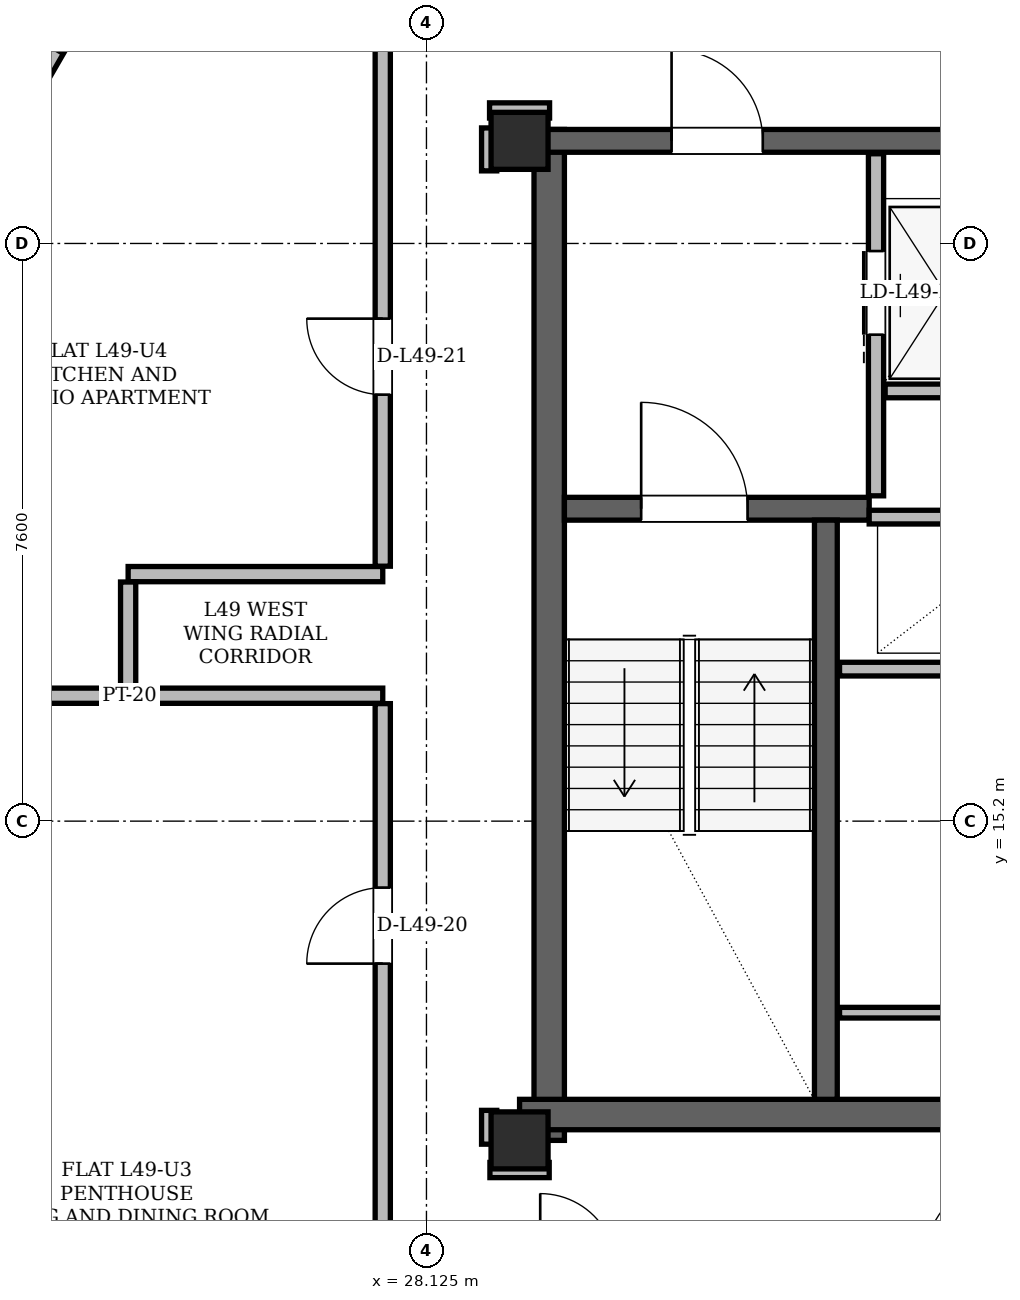
"""IFC4 building model, lengths in metres.
Left out: names, types, materials, properties, quantities, classifications, styles, units other than length and angle.
Written with IfcOpenShell. Run it as: python <this file> out.ifc"""

import sys

from ifc_helpers import new_model, si_unit, direction, frame, frame_2d, origin, origin_2d, place, context, subcontext, project, spatial, rectangle, hollow_rectangle, extrude, element, fill, save


model = new_model("IFC4")
c1 = context("Model", 3, precision=1e-05, world=origin(), true_north=direction((0.0, 1.0)))
c2 = subcontext(c1, "Body", "Model", "MODEL_VIEW")
j1 = project(units=[si_unit("LENGTHUNIT", "METRE"), si_unit("PLANEANGLEUNIT", "RADIAN")], contexts=[c1])
p1 = place(None, origin())
s1 = spatial("IfcSite", under=j1, at=p1, CompositionType="ELEMENT")
p2 = place(p1, origin())
s2 = spatial("IfcBuilding", under=s1, at=p2, CompositionType="ELEMENT")
p3 = place(p2, frame((0.0, 0.0, 185.4)))
s3 = spatial("IfcBuildingStorey", under=s2, at=p3, CompositionType="ELEMENT", Elevation=185.4)
for number, where, z_axis, x_axis in (
    (1, (29.35, 11.0, 0.0), (0.0, 0.0, 1.0), (1.0, 0.0, 0.0)),
    (2, (29.35, 24.15, 0.0), (0.0, 0.0, 1.0), (1.0, 0.0, 0.0)),
):
    element("IfcColumn", number, at=place(p3, frame(where, z_axis=z_axis, x_axis=x_axis)), inside=s3, PredefinedType="COLUMN", context=c2, shape_type="SweptSolid", body=[
        extrude(hollow_rectangle(XDim=0.75, YDim=0.75, WallThickness=0.06, at=origin_2d()), origin(), (0.0, 0.0, 1.0), 3.6),
    ])
p4 = place(p3, frame((29.74, 11.0, 0.0), z_axis=(0.0, 0.0, 1.0), x_axis=(0.0, 1.0, 0.0)))
e3 = element("IfcWall", 3, at=p4, inside=s3, PredefinedType="SHEAR", context=c2, shape_type="SweptSolid", body=[
    extrude(rectangle(XDim=13.3, YDim=0.4, at=frame_2d((6.65, 0.0))), origin(), (0.0, 0.0, 1.0), 3.34),
])
p5 = place(p3, frame((29.35, 11.34, 0.0), z_axis=(0.0, 0.0, 1.0), x_axis=(1.0, 0.0, 0.0)))
e4 = element("IfcWall", 4, at=p5, inside=s3, PredefinedType="SHEAR", context=c2, shape_type="SweptSolid", body=[
    extrude(rectangle(XDim=7.1, YDim=0.4, at=frame_2d((3.55, 0.0))), origin(), (0.0, 0.0, 1.0), 3.34),
])
p6 = place(p3, frame((29.65, 24.15, 0.0), z_axis=(0.0, 0.0, 1.0), x_axis=(1.0, 0.0, 0.0)))
e5 = element("IfcWall", 5, at=p6, inside=s3, PredefinedType="SHEAR", context=c2, shape_type="SweptSolid", body=[
    extrude(rectangle(XDim=15.7, YDim=0.3, at=frame_2d((7.85, 0.0))), origin(), (0.0, 0.0, 1.0), 3.34),
])
p7 = place(p6, frame((1.7, 0.0, 0.0)))
e6 = element("IfcOpeningElement", 6, at=p7, cuts=e5, PredefinedType="OPENING", context=c2, shape_type="SweptSolid", body=[
    extrude(rectangle(XDim=1.2, YDim=2.2, at=frame_2d((0.6, 1.1))), frame((0.0, 0.15, 0.0), z_axis=(0.0, -1.0, 0.0), x_axis=(1.0, 0.0, 0.0)), (0.0, 0.0, 1.0), 0.3),
])
p8 = place(p6, frame((12.8, 0.0, 0.0)))
e7 = element("IfcOpeningElement", 7, at=p8, cuts=e5, PredefinedType="OPENING", context=c2, shape_type="SweptSolid", body=[
    extrude(rectangle(XDim=1.2, YDim=2.2, at=frame_2d((0.6, 1.1))), frame((0.0, 0.15, 0.0), z_axis=(0.0, -1.0, 0.0), x_axis=(1.0, 0.0, 0.0)), (0.0, 0.0, 1.0), 0.3),
])
p9 = place(p6, frame((6.55, 0.0, 0.0)))
e8 = element("IfcOpeningElement", 8, at=p9, cuts=e5, PredefinedType="OPENING", context=c2, shape_type="SweptSolid", body=[
    extrude(rectangle(XDim=0.9, YDim=2.05, at=frame_2d((0.45, 1.025))), frame((0.0, 0.15, 0.0), z_axis=(0.0, -1.0, 0.0), x_axis=(1.0, 0.0, 0.0)), (0.0, 0.0, 1.0), 0.3),
])
p10 = place(p6, frame((8.45, 0.0, 0.0)))
e9 = element("IfcOpeningElement", 9, at=p10, cuts=e5, PredefinedType="OPENING", context=c2, shape_type="SweptSolid", body=[
    extrude(rectangle(XDim=0.9, YDim=2.05, at=frame_2d((0.45, 1.025))), frame((0.0, 0.15, 0.0), z_axis=(0.0, -1.0, 0.0), x_axis=(1.0, 0.0, 0.0)), (0.0, 0.0, 1.0), 0.3),
])
p11 = place(p3, frame((29.94, 19.31, 0.0), z_axis=(0.0, 0.0, 1.0), x_axis=(1.0, 0.0, 0.0)))
e10 = element("IfcWall", 10, at=p11, inside=s3, PredefinedType="SHEAR", context=c2, shape_type="SweptSolid", body=[
    extrude(rectangle(XDim=4.01, YDim=0.3, at=frame_2d((2.005, 0.0))), origin(), (0.0, 0.0, 1.0), 3.34),
])
p12 = place(p11, frame((1.01, 0.0, 0.0)))
e11 = element("IfcOpeningElement", 11, at=p12, cuts=e10, PredefinedType="OPENING", context=c2, shape_type="SweptSolid", body=[
    extrude(rectangle(XDim=1.4, YDim=2.2, at=frame_2d((0.7, 1.1))), frame((0.0, 0.15, 0.0), z_axis=(0.0, -1.0, 0.0), x_axis=(1.0, 0.0, 0.0)), (0.0, 0.0, 1.0), 0.3),
])
p13 = place(p3, frame((33.38, 11.54, 0.0), z_axis=(0.0, 0.0, 1.0), x_axis=(0.0, 1.0, 0.0)))
e12 = element("IfcWall", 12, at=p13, inside=s3, PredefinedType="SHEAR", context=c2, shape_type="SweptSolid", body=[
    extrude(rectangle(XDim=7.62, YDim=0.3, at=frame_2d((3.81, 0.0))), origin(), (0.0, 0.0, 1.0), 3.34),
])
p14 = place(p3, frame((33.539, 43.238, 0.0), z_axis=(0.0, 0.0, 1.0), x_axis=(-0.500007042689, -0.866021337648, 0.0)))
e13 = element("IfcWall", 13, at=p14, inside=s3, PredefinedType="SOLIDWALL", context=c2, shape_type="SweptSolid", body=[
    extrude(rectangle(XDim=36.115, YDim=0.29, at=frame_2d((18.057, 0.0))), origin(), (0.0, 0.0, 1.0), 2.56),
])
p15 = place(p14, frame((8.034, 0.0, 0.0)))
e14 = element("IfcOpeningElement", 14, at=p15, cuts=e13, PredefinedType="OPENING", context=c2, shape_type="SweptSolid", body=[
    extrude(rectangle(XDim=1.5, YDim=2.2, at=frame_2d((0.75, 1.1))), frame((0.0, 0.145, 0.0), z_axis=(0.0, -1.0, 0.0), x_axis=(1.0, 0.0, 0.0)), (0.0, 0.0, 1.0), 0.29),
])
p16 = place(p14, frame((28.035, 0.0, 0.0)))
e15 = element("IfcOpeningElement", 15, at=p16, cuts=e13, PredefinedType="OPENING", context=c2, shape_type="SweptSolid", body=[
    extrude(rectangle(XDim=1.5, YDim=2.2, at=frame_2d((0.75, 1.1))), frame((0.0, 0.145, 0.0), z_axis=(0.0, -1.0, 0.0), x_axis=(1.0, 0.0, 0.0)), (0.0, 0.0, 1.0), 0.29),
])
p17 = place(p14, frame((33.831, 0.0, 0.85)))
e16 = element("IfcOpeningElement", 16, at=p17, cuts=e13, PredefinedType="OPENING", context=c2, shape_type="SweptSolid", body=[
    extrude(rectangle(XDim=1.2, YDim=1.48, at=frame_2d((0.6, 0.74))), frame((0.0, 0.145, 0.0), z_axis=(0.0, -1.0, 0.0), x_axis=(1.0, 0.0, 0.0)), (0.0, 0.0, 1.0), 0.29),
])
p18 = place(p14, frame((18.648, 0.0, 0.85)))
e17 = element("IfcOpeningElement", 17, at=p18, cuts=e13, PredefinedType="OPENING", context=c2, shape_type="SweptSolid", body=[
    extrude(rectangle(XDim=2.0, YDim=1.6, at=frame_2d((1.0, 0.8))), frame((0.0, 0.145, 0.0), z_axis=(0.0, -1.0, 0.0), x_axis=(1.0, 0.0, 0.0)), (0.0, 0.0, 1.0), 0.29),
])
p19 = place(p14, frame((26.235, 0.0, 0.85)))
e18 = element("IfcOpeningElement", 18, at=p19, cuts=e13, PredefinedType="OPENING", context=c2, shape_type="SweptSolid", body=[
    extrude(rectangle(XDim=1.2, YDim=1.48, at=frame_2d((0.6, 0.74))), frame((0.0, 0.145, 0.0), z_axis=(0.0, -1.0, 0.0), x_axis=(1.0, 0.0, 0.0)), (0.0, 0.0, 1.0), 0.29),
])
p20 = place(p14, frame((15.622, 0.0, 0.85)))
e19 = element("IfcOpeningElement", 19, at=p20, cuts=e13, PredefinedType="OPENING", context=c2, shape_type="SweptSolid", body=[
    extrude(rectangle(XDim=1.2, YDim=1.48, at=frame_2d((0.6, 0.74))), frame((0.0, 0.145, 0.0), z_axis=(0.0, -1.0, 0.0), x_axis=(1.0, 0.0, 0.0)), (0.0, 0.0, 1.0), 0.29),
])
p21 = place(p14, frame((6.537, 0.0, 0.85)))
e20 = element("IfcOpeningElement", 20, at=p21, cuts=e13, PredefinedType="OPENING", context=c2, shape_type="SweptSolid", body=[
    extrude(rectangle(XDim=1.2, YDim=1.48, at=frame_2d((0.6, 0.74))), frame((0.0, 0.145, 0.0), z_axis=(0.0, -1.0, 0.0), x_axis=(1.0, 0.0, 0.0)), (0.0, 0.0, 1.0), 0.29),
])
p22 = place(p14, frame((13.204, 0.0, 0.85)))
e21 = element("IfcOpeningElement", 21, at=p22, cuts=e13, PredefinedType="OPENING", context=c2, shape_type="SweptSolid", body=[
    extrude(rectangle(XDim=1.6, YDim=1.6, at=frame_2d((0.8, 0.8))), frame((0.0, 0.145, 0.0), z_axis=(0.0, -1.0, 0.0), x_axis=(1.0, 0.0, 0.0)), (0.0, 0.0, 1.0), 0.29),
])
p23 = place(p14, frame((1.107, 0.0, 0.85)))
e22 = element("IfcOpeningElement", 22, at=p23, cuts=e13, PredefinedType="OPENING", context=c2, shape_type="SweptSolid", body=[
    extrude(rectangle(XDim=2.0, YDim=1.6, at=frame_2d((1.0, 0.8))), frame((0.0, 0.145, 0.0), z_axis=(0.0, -1.0, 0.0), x_axis=(1.0, 0.0, 0.0)), (0.0, 0.0, 1.0), 0.29),
])
p24 = place(p3, frame((34.04, 19.48, 0.0), z_axis=(0.0, 0.0, 1.0), x_axis=(0.0, 1.0, 0.0)))
e23 = element("IfcWall", 23, at=p24, inside=s3, PredefinedType="PARTITIONING", context=c2, shape_type="SweptSolid", body=[
    extrude(rectangle(XDim=4.5, YDim=0.2, at=frame_2d((2.25, 0.0))), origin(), (0.0, 0.0, 1.0), 3.34),
])
p25 = place(p24, frame((2.12, 0.0, 0.0)))
e24 = element("IfcOpeningElement", 24, at=p25, cuts=e23, PredefinedType="OPENING", context=c2, shape_type="SweptSolid", body=[
    extrude(rectangle(XDim=1.1, YDim=2.2, at=frame_2d((0.55, 1.1))), frame((0.0, 0.1, 0.0), z_axis=(0.0, -1.0, 0.0), x_axis=(1.0, 0.0, 0.0)), (0.0, 0.0, 1.0), 0.2),
])
p26 = place(p3, frame((34.16, 20.86, 0.0), z_axis=(0.0, 0.0, 1.0), x_axis=(1.0, 0.0, 0.0)))
e25 = element("IfcWall", 25, at=p26, inside=s3, PredefinedType="PARTITIONING", context=c2, shape_type="SweptSolid", body=[
    extrude(rectangle(XDim=1.58, YDim=0.18, at=frame_2d((0.79, 0.0))), origin(), (0.0, 0.0, 1.0), 3.34),
])
p27 = place(p3, frame((33.95, 19.2, 0.0), z_axis=(0.0, 0.0, 1.0), x_axis=(1.0, 0.0, 0.0)))
e26 = element("IfcWall", 26, at=p27, inside=s3, PredefinedType="PARTITIONING", context=c2, shape_type="SweptSolid", body=[
    extrude(rectangle(XDim=2.27, YDim=0.18, at=frame_2d((1.135, 0.0))), origin(), (0.0, 0.0, 1.0), 3.34),
])
p28 = place(p3, frame((33.56, 17.2, 0.0), z_axis=(0.0, 0.0, 1.0), x_axis=(1.0, 0.0, 0.0)))
e27 = element("IfcWall", 27, at=p28, inside=s3, PredefinedType="PARTITIONING", context=c2, shape_type="SweptSolid", body=[
    extrude(rectangle(XDim=2.66, YDim=0.18, at=frame_2d((1.33, 0.0))), origin(), (0.0, 0.0, 1.0), 3.34),
])
p29 = place(p3, frame((33.56, 12.68, 0.0), z_axis=(0.0, 0.0, 1.0), x_axis=(1.0, 0.0, 0.0)))
e28 = element("IfcWall", 28, at=p29, inside=s3, PredefinedType="PARTITIONING", context=c2, shape_type="SweptSolid", body=[
    extrude(rectangle(XDim=2.66, YDim=0.14, at=frame_2d((1.33, 0.0))), origin(), (0.0, 0.0, 1.0), 3.34),
])
p30 = place(p3, frame((28.96, 10.61, 0.0), z_axis=(0.0, 0.0, 1.0), x_axis=(1.0, 0.0, 0.0)))
e29 = element("IfcWall", 29, at=p30, inside=s3, PredefinedType="PARTITIONING", context=c2, shape_type="SweptSolid", body=[
    extrude(rectangle(XDim=0.78, YDim=0.2, at=frame_2d((0.39, 0.0))), origin(), (0.0, 0.0, 1.0), 3.34),
])
p31 = place(p3, frame((18.604, 16.85, 0.0), z_axis=(0.0, 0.0, 1.0), x_axis=(1.0, 0.0, 0.0)))
e30 = element("IfcWall", 30, at=p31, inside=s3, PredefinedType="PARTITIONING", context=c2, shape_type="SweptSolid", body=[
    extrude(rectangle(XDim=8.946, YDim=0.2, at=frame_2d((4.473, 0.0))), origin(), (0.0, 0.0, 1.0), 3.34),
])
p32 = place(p3, frame((24.2, 18.45, 0.0), z_axis=(0.0, 0.0, 1.0), x_axis=(1.0, 0.0, 0.0)))
e31 = element("IfcWall", 31, at=p32, inside=s3, PredefinedType="PARTITIONING", context=c2, shape_type="SweptSolid", body=[
    extrude(rectangle(XDim=3.35, YDim=0.2, at=frame_2d((1.675, 0.0))), origin(), (0.0, 0.0, 1.0), 3.34),
])
p33 = place(p3, frame((28.955, 24.55, 0.0), z_axis=(0.0, 0.0, 1.0), x_axis=(1.0, 0.0, 0.0)))
e32 = element("IfcWall", 32, at=p33, inside=s3, PredefinedType="PARTITIONING", context=c2, shape_type="SweptSolid", body=[
    extrude(rectangle(XDim=0.79, YDim=0.2, at=frame_2d((0.395, 0.0))), origin(), (0.0, 0.0, 1.0), 2.802),
])
p34 = place(p3, frame((24.2, 16.954, 0.0), z_axis=(0.0, 0.0, 1.0), x_axis=(0.0, 1.0, 0.0)))
e33 = element("IfcWall", 33, at=p34, inside=s3, PredefinedType="PARTITIONING", context=c2, shape_type="SweptSolid", body=[
    extrude(rectangle(XDim=1.392, YDim=0.2, at=frame_2d((0.696, 0.0))), origin(), (0.0, 0.0, 1.0), 3.34),
])
p35 = place(p3, frame((27.55, 5.25, 0.0), z_axis=(0.0, 0.0, 1.0), x_axis=(0.0, 1.0, 0.0)))
e34 = element("IfcWall", 34, at=p35, inside=s3, PredefinedType="PARTITIONING", context=c2, shape_type="SweptSolid", body=[
    extrude(rectangle(XDim=11.497, YDim=0.2, at=frame_2d((5.748, 0.0))), origin(), (0.0, 0.0, 1.0), 2.802),
])
p36 = place(p35, frame((8.076, 0.0, 0.0)))
e35 = element("IfcOpeningElement", 35, at=p36, cuts=e34, PredefinedType="OPENING", context=c2, shape_type="SweptSolid", body=[
    extrude(rectangle(XDim=1.0, YDim=2.18, at=frame_2d((0.5, 1.09))), frame((0.0, 0.1, 0.0), z_axis=(0.0, -1.0, 0.0), x_axis=(1.0, 0.0, 0.0)), (0.0, 0.0, 1.0), 0.2),
])
p37 = place(p3, frame((27.55, 18.554, 0.0), z_axis=(0.0, 0.0, 1.0), x_axis=(0.0, 1.0, 0.0)))
e36 = element("IfcWall", 36, at=p37, inside=s3, PredefinedType="PARTITIONING", context=c2, shape_type="SweptSolid", body=[
    extrude(rectangle(XDim=14.013, YDim=0.2, at=frame_2d((7.007, 0.0))), origin(), (0.0, 0.0, 1.0), 2.56),
])
p38 = place(p37, frame((2.257, 0.0, 0.0)))
e37 = element("IfcOpeningElement", 37, at=p38, cuts=e36, PredefinedType="OPENING", context=c2, shape_type="SweptSolid", body=[
    extrude(rectangle(XDim=1.0, YDim=2.18, at=frame_2d((0.5, 1.09))), frame((0.0, 0.1, 0.0), z_axis=(0.0, -1.0, 0.0), x_axis=(1.0, 0.0, 0.0)), (0.0, 0.0, 1.0), 0.2),
])
p39 = place(p3, frame((28.95, 10.95, 0.0), z_axis=(0.0, 0.0, 1.0), x_axis=(0.0, 1.0, 0.0)))
e38 = element("IfcWall", 38, at=p39, inside=s3, PredefinedType="PARTITIONING", context=c2, shape_type="SweptSolid", body=[
    extrude(rectangle(XDim=0.445, YDim=0.2, at=frame_2d((0.223, 0.0))), origin(), (0.0, 0.0, 1.0), 2.802),
])
p40 = place(p3, frame((28.95, 23.755, 0.0), z_axis=(0.0, 0.0, 1.0), x_axis=(0.0, 1.0, 0.0)))
e39 = element("IfcWall", 39, at=p40, inside=s3, PredefinedType="PARTITIONING", context=c2, shape_type="SweptSolid", body=[
    extrude(rectangle(XDim=0.565, YDim=0.2, at=frame_2d((0.283, 0.0))), origin(), (0.0, 0.0, 1.0), 3.34),
])
p41 = place(p25, origin())
e40 = element("IfcDoor", 40, at=p41, inside=s3, OperationType="SLIDING_TO_LEFT", PredefinedType="DOOR", context=c2, shape_type="SweptSolid", body=[
    extrude(rectangle(XDim=1.1, YDim=2.2, at=frame_2d((0.55, 1.1))), frame((0.0, 0.025, 0.0), z_axis=(0.0, -1.0, 0.0), x_axis=(1.0, 0.0, 0.0)), (0.0, 0.0, 1.0), 0.05),
])
fill(e24, e40)
p42 = place(p12, origin())
e41 = element("IfcDoor", 41, at=p42, inside=s3, OperationType="SINGLE_SWING_LEFT", PredefinedType="DOOR", context=c2, shape_type="SweptSolid", body=[
    extrude(rectangle(XDim=1.4, YDim=2.2, at=frame_2d((0.7, 1.1))), frame((0.0, 0.025, 0.0), z_axis=(0.0, -1.0, 0.0), x_axis=(1.0, 0.0, 0.0)), (0.0, 0.0, 1.0), 0.05),
])
fill(e11, e41)
p43 = place(p7, origin())
e42 = element("IfcDoor", 42, at=p43, inside=s3, OperationType="SINGLE_SWING_LEFT", PredefinedType="DOOR", context=c2, shape_type="SweptSolid", body=[
    extrude(rectangle(XDim=1.2, YDim=2.2, at=frame_2d((0.6, 1.1))), frame((0.0, 0.025, 0.0), z_axis=(0.0, -1.0, 0.0), x_axis=(1.0, 0.0, 0.0)), (0.0, 0.0, 1.0), 0.05),
])
fill(e6, e42)
p44 = place(p36, origin())
e43 = element("IfcDoor", 43, at=p44, inside=s3, OperationType="SINGLE_SWING_LEFT", PredefinedType="DOOR", context=c2, shape_type="SweptSolid", body=[
    extrude(rectangle(XDim=1.0, YDim=2.18, at=frame_2d((0.5, 1.09))), frame((0.0, 0.025, 0.0), z_axis=(0.0, -1.0, 0.0), x_axis=(1.0, 0.0, 0.0)), (0.0, 0.0, 1.0), 0.05),
])
fill(e35, e43)
p45 = place(p38, origin())
e44 = element("IfcDoor", 44, at=p45, inside=s3, OperationType="SINGLE_SWING_RIGHT", PredefinedType="DOOR", context=c2, shape_type="SweptSolid", body=[
    extrude(rectangle(XDim=1.0, YDim=2.18, at=frame_2d((0.5, 1.09))), frame((0.0, 0.025, 0.0), z_axis=(0.0, -1.0, 0.0), x_axis=(1.0, 0.0, 0.0)), (0.0, 0.0, 1.0), 0.05),
])
fill(e37, e44)
save(model, sys.argv[1])
